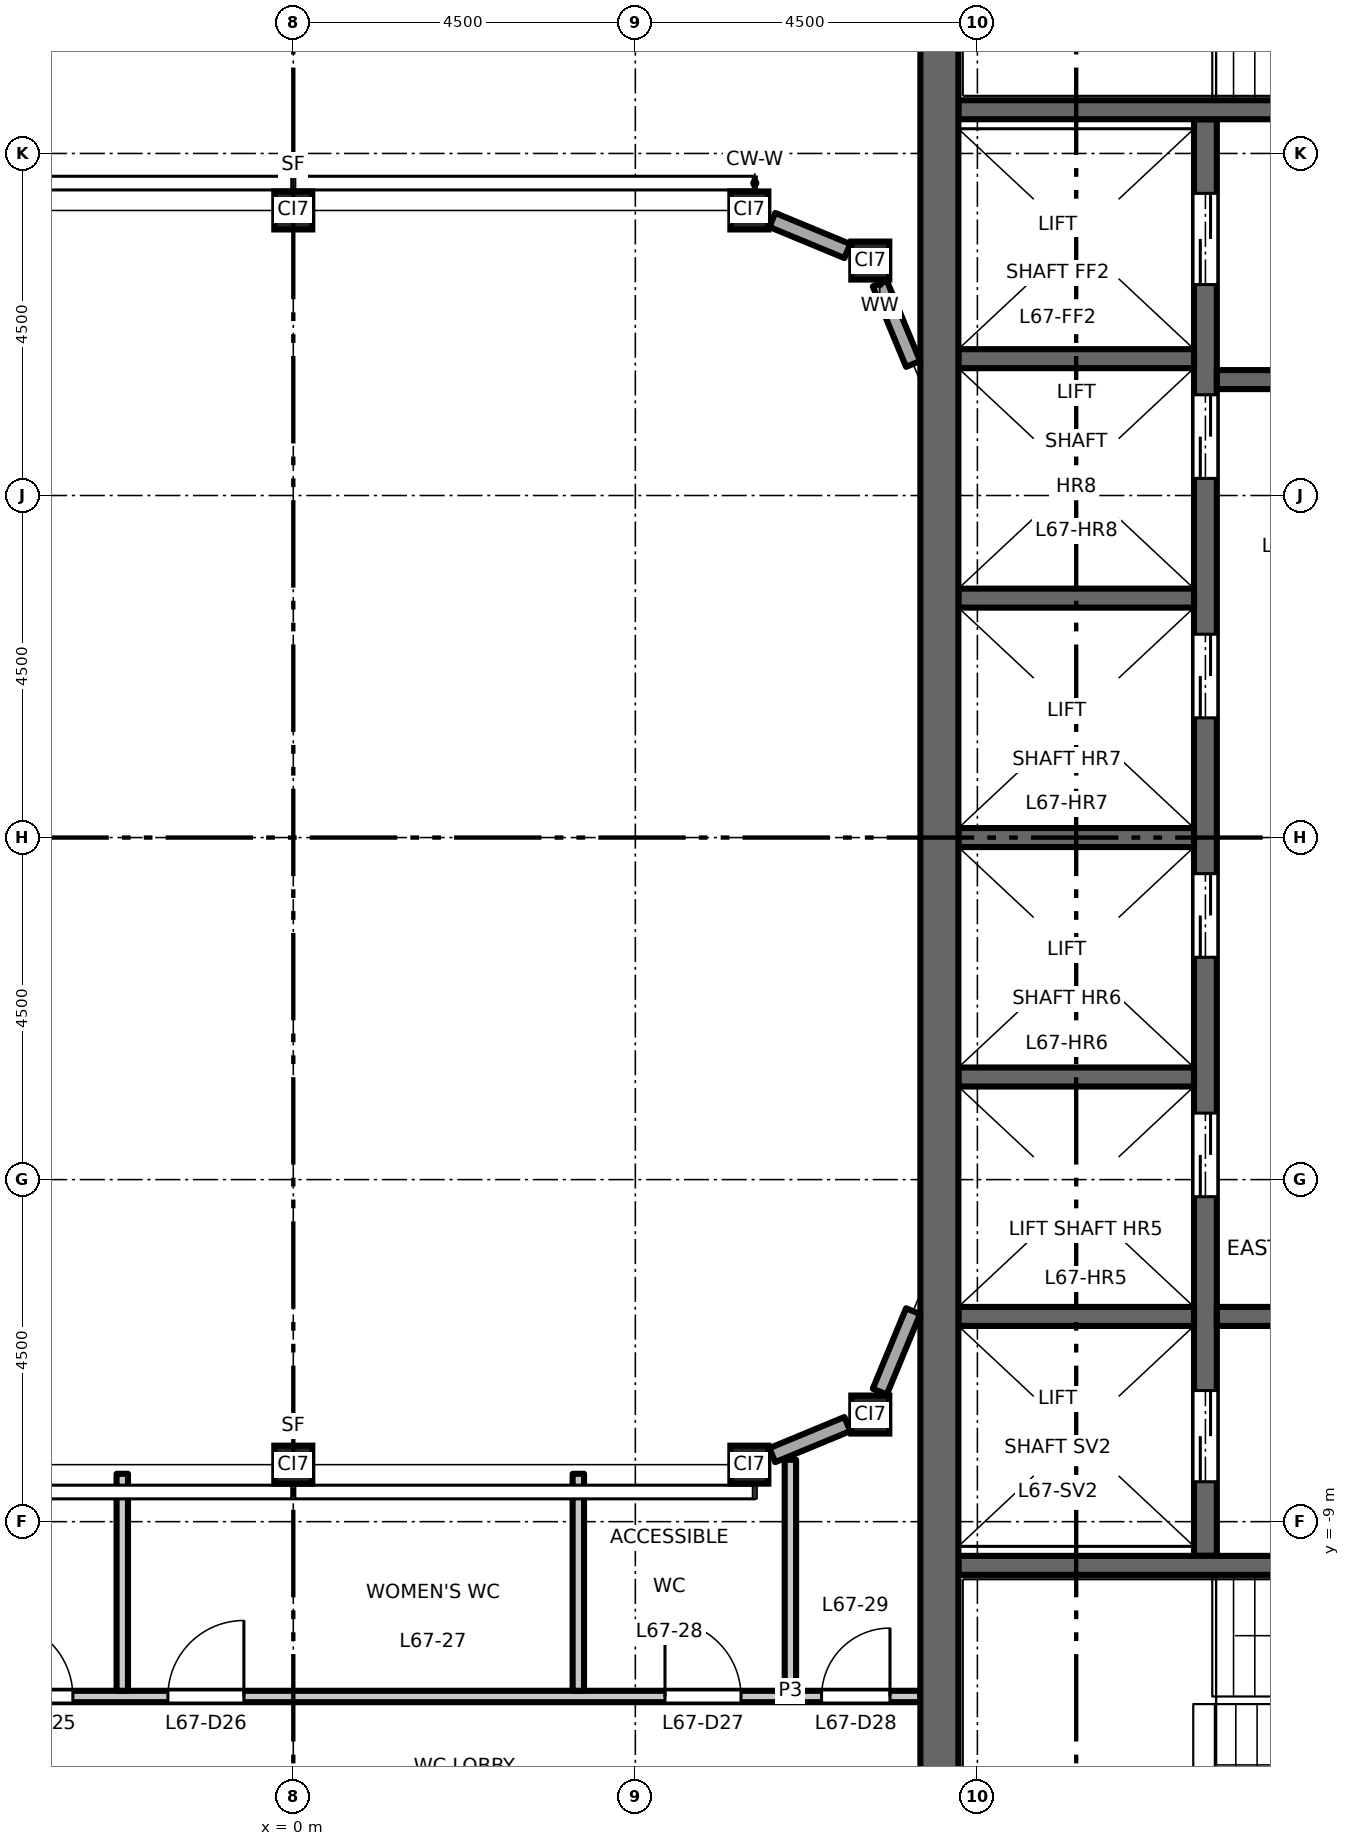
"""IFC4 building model, lengths in metres.
Left out: names, types, materials, properties, quantities, classifications, styles, units other than length and angle.
Written with IfcOpenShell. Run it as: python <this file> out.ifc"""

import sys

from ifc_helpers import new_model, si_unit, direction, frame, frame_2d, origin, origin_2d, place, context, subcontext, project, spatial, rectangle, hollow_rectangle, extrude, element, fill, save


model = new_model("IFC4")
c1 = context("Model", 3, precision=1e-05, world=origin(), true_north=direction((0.0, 1.0)))
c2 = subcontext(c1, "Body", "Model", "MODEL_VIEW")
j1 = project(units=[si_unit("LENGTHUNIT", "METRE"), si_unit("PLANEANGLEUNIT", "RADIAN")], contexts=[c1])
p1 = place(None, origin())
s1 = spatial("IfcSite", under=j1, at=p1, CompositionType="ELEMENT")
p2 = place(p1, origin())
s2 = spatial("IfcBuilding", under=s1, at=p2, CompositionType="ELEMENT")
p3 = place(p2, frame((0.0, 0.0, 312.2)))
s3 = spatial("IfcBuildingStorey", under=s2, at=p3, CompositionType="ELEMENT", Elevation=312.2)
for number, where, z_axis, x_axis in (
    (1, (0.0, -8.25, 0.0), (0.0, 0.0, 1.0), (1.0, 0.0, 0.0)),
    (2, (6.0, -8.25, 0.0), (0.0, 0.0, 1.0), (1.0, 0.0, 0.0)),
    (3, (7.591, -7.591, 0.0), (0.0, 0.0, 1.0), (1.0, 0.0, 0.0)),
    (4, (0.0, 8.25, 0.0), (0.0, 0.0, 1.0), (1.0, 0.0, 0.0)),
    (5, (6.0, 8.25, 0.0), (0.0, 0.0, 1.0), (1.0, 0.0, 0.0)),
    (6, (7.591, 7.591, 0.0), (0.0, 0.0, 1.0), (1.0, 0.0, 0.0)),
):
    element("IfcColumn", number, at=place(p3, frame(where, z_axis=z_axis, x_axis=x_axis)), inside=s3, PredefinedType="COLUMN", context=c2, shape_type="SweptSolid", body=[
        extrude(hollow_rectangle(XDim=0.5, YDim=0.5, WallThickness=0.025, at=origin_2d()), origin(), (0.0, 0.0, 1.0), 4.5),
    ])
p4 = place(p3, frame((12.0, -9.45, 0.0), z_axis=(0.0, 0.0, 1.0), x_axis=(0.0, 1.0, 0.0)))
e7 = element("IfcWall", 7, at=p4, inside=s3, PredefinedType="SHEAR", context=c2, shape_type="SweptSolid", body=[
    extrude(rectangle(XDim=18.9, YDim=0.3, at=frame_2d((9.45, 0.0))), origin(), (0.0, 0.0, 1.0), 4.35),
])
p5 = place(p4, frame((4.725, 0.0, 0.0)))
e8 = element("IfcOpeningElement", 8, at=p5, cuts=e7, PredefinedType="OPENING", context=c2, shape_type="SweptSolid", body=[
    extrude(rectangle(XDim=1.1, YDim=2.1, at=frame_2d((0.55, 1.05))), frame((0.0, 0.16, 0.0), z_axis=(0.0, -1.0, 0.0), x_axis=(1.0, 0.0, 0.0)), (0.0, 0.0, 1.0), 0.32),
])
p6 = place(p4, frame((7.875, 0.0, 0.0)))
e9 = element("IfcOpeningElement", 9, at=p6, cuts=e7, PredefinedType="OPENING", context=c2, shape_type="SweptSolid", body=[
    extrude(rectangle(XDim=1.1, YDim=2.1, at=frame_2d((0.55, 1.05))), frame((0.0, 0.16, 0.0), z_axis=(0.0, -1.0, 0.0), x_axis=(1.0, 0.0, 0.0)), (0.0, 0.0, 1.0), 0.32),
])
p7 = place(p4, frame((11.025, 0.0, 0.0)))
e10 = element("IfcOpeningElement", 10, at=p7, cuts=e7, PredefinedType="OPENING", context=c2, shape_type="SweptSolid", body=[
    extrude(rectangle(XDim=1.1, YDim=2.1, at=frame_2d((0.55, 1.05))), frame((0.0, 0.16, 0.0), z_axis=(0.0, -1.0, 0.0), x_axis=(1.0, 0.0, 0.0)), (0.0, 0.0, 1.0), 0.32),
])
p8 = place(p4, frame((14.175, 0.0, 0.0)))
e11 = element("IfcOpeningElement", 11, at=p8, cuts=e7, PredefinedType="OPENING", context=c2, shape_type="SweptSolid", body=[
    extrude(rectangle(XDim=1.1, YDim=2.1, at=frame_2d((0.55, 1.05))), frame((0.0, 0.16, 0.0), z_axis=(0.0, -1.0, 0.0), x_axis=(1.0, 0.0, 0.0)), (0.0, 0.0, 1.0), 0.32),
])
p9 = place(p4, frame((16.725, 0.0, 0.0)))
e12 = element("IfcOpeningElement", 12, at=p9, cuts=e7, PredefinedType="OPENING", context=c2, shape_type="SweptSolid", body=[
    extrude(rectangle(XDim=1.2, YDim=2.1, at=frame_2d((0.6, 1.05))), frame((0.0, 0.16, 0.0), z_axis=(0.0, -1.0, 0.0), x_axis=(1.0, 0.0, 0.0)), (0.0, 0.0, 1.0), 0.32),
])
p10 = place(p4, frame((0.975, 0.0, 0.0)))
e13 = element("IfcOpeningElement", 13, at=p10, cuts=e7, PredefinedType="OPENING", context=c2, shape_type="SweptSolid", body=[
    extrude(rectangle(XDim=1.2, YDim=2.1, at=frame_2d((0.6, 1.05))), frame((0.0, 0.16, 0.0), z_axis=(0.0, -1.0, 0.0), x_axis=(1.0, 0.0, 0.0)), (0.0, 0.0, 1.0), 0.32),
])
p11 = place(p3, frame((12.15, 6.025, 0.0), z_axis=(0.0, 0.0, 1.0), x_axis=(1.0, 0.0, 0.0)))
e14 = element("IfcWall", 14, at=p11, inside=s3, PredefinedType="SHEAR", context=c2, shape_type="SweptSolid", body=[
    extrude(rectangle(XDim=4.6, YDim=0.25, at=frame_2d((2.3, 0.0))), origin(), (0.0, 0.0, 1.0), 4.35),
])
p12 = place(p11, frame((1.8, 0.0, 0.0)))
e15 = element("IfcOpeningElement", 15, at=p12, cuts=e14, PredefinedType="OPENING", context=c2, shape_type="SweptSolid", body=[
    extrude(rectangle(XDim=1.0, YDim=2.1, at=frame_2d((0.5, 1.05))), frame((0.0, 0.135, 0.0), z_axis=(0.0, -1.0, 0.0), x_axis=(1.0, 0.0, 0.0)), (0.0, 0.0, 1.0), 0.27),
])
p13 = place(p3, frame((12.15, -6.3, 0.0), z_axis=(0.0, 0.0, 1.0), x_axis=(1.0, 0.0, 0.0)))
e16 = element("IfcWall", 16, at=p13, inside=s3, PredefinedType="SHEAR", context=c2, shape_type="SweptSolid", body=[
    extrude(rectangle(XDim=4.6, YDim=0.25, at=frame_2d((2.3, 0.0))), origin(), (0.0, 0.0, 1.0), 4.35),
])
p14 = place(p13, frame((1.8, 0.0, 0.0)))
e17 = element("IfcOpeningElement", 17, at=p14, cuts=e16, PredefinedType="OPENING", context=c2, shape_type="SweptSolid", body=[
    extrude(rectangle(XDim=1.0, YDim=2.1, at=frame_2d((0.5, 1.05))), frame((0.0, 0.135, 0.0), z_axis=(0.0, -1.0, 0.0), x_axis=(1.0, 0.0, 0.0)), (0.0, 0.0, 1.0), 0.27),
])
for number, where, z_axis, x_axis in (
    (18, (8.75, 0.0, 0.0), (0.0, 0.0, 1.0), (1.0, 0.0, 0.0)),
    (19, (8.75, 3.15, 0.0), (0.0, 0.0, 1.0), (1.0, 0.0, 0.0)),
    (20, (8.75, 6.3, 0.0), (0.0, 0.0, 1.0), (1.0, 0.0, 0.0)),
    (21, (8.75, -3.15, 0.0), (0.0, 0.0, 1.0), (1.0, 0.0, 0.0)),
    (22, (8.75, -6.3, 0.0), (0.0, 0.0, 1.0), (1.0, 0.0, 0.0)),
):
    element("IfcWall", number, at=place(p3, frame(where, z_axis=z_axis, x_axis=x_axis)), inside=s3, PredefinedType="SHEAR", context=c2, shape_type="SweptSolid", body=[
        extrude(rectangle(XDim=3.1, YDim=0.25, at=frame_2d((1.55, 0.0))), origin(), (0.0, 0.0, 1.0), 4.35),
    ])
p15 = place(p3, frame((8.75, 9.575, 0.0), z_axis=(0.0, 0.0, 1.0), x_axis=(1.0, 0.0, 0.0)))
e23 = element("IfcWall", 23, at=p15, inside=s3, PredefinedType="SHEAR", context=c2, shape_type="SweptSolid", body=[
    extrude(rectangle(XDim=8.0, YDim=0.25, at=frame_2d((4.0, 0.0))), origin(), (0.0, 0.0, 1.0), 4.35),
])
p16 = place(p15, frame((6.65, 0.0, 0.0)))
e24 = element("IfcOpeningElement", 24, at=p16, cuts=e23, PredefinedType="OPENING", context=c2, shape_type="SweptSolid", body=[
    extrude(rectangle(XDim=1.1, YDim=2.1, at=frame_2d((0.55, 1.05))), frame((0.0, 0.135, 0.0), z_axis=(0.0, -1.0, 0.0), x_axis=(1.0, 0.0, 0.0)), (0.0, 0.0, 1.0), 0.27),
])
p17 = place(p3, frame((8.75, -9.575, 0.0), z_axis=(0.0, 0.0, 1.0), x_axis=(1.0, 0.0, 0.0)))
e25 = element("IfcWall", 25, at=p17, inside=s3, PredefinedType="SHEAR", context=c2, shape_type="SweptSolid", body=[
    extrude(rectangle(XDim=8.0, YDim=0.25, at=frame_2d((4.0, 0.0))), origin(), (0.0, 0.0, 1.0), 4.35),
])
p18 = place(p17, frame((6.65, 0.0, 0.0)))
e26 = element("IfcOpeningElement", 26, at=p18, cuts=e25, PredefinedType="OPENING", context=c2, shape_type="SweptSolid", body=[
    extrude(rectangle(XDim=1.1, YDim=2.1, at=frame_2d((0.55, 1.05))), frame((0.0, 0.135, 0.0), z_axis=(0.0, -1.0, 0.0), x_axis=(1.0, 0.0, 0.0)), (0.0, 0.0, 1.0), 0.27),
])
p19 = place(p3, frame((8.5, -13.0, 0.0), z_axis=(0.0, 0.0, 1.0), x_axis=(0.0, 1.0, 0.0)))
e27 = element("IfcWall", 27, at=p19, inside=s3, PredefinedType="SHEAR", context=c2, shape_type="SweptSolid", body=[
    extrude(rectangle(XDim=26.0, YDim=0.5, at=frame_2d((13.0, 0.0))), origin(), (0.0, 0.0, 1.0), 4.35),
])
p20 = place(p3, frame((6.302, -8.125, 0.0), z_axis=(0.0, 0.0, 1.0), x_axis=(0.923919409248, 0.382587147216, 0.0)))
e28 = element("IfcWall", 28, at=p20, inside=s3, PredefinedType="STANDARD", context=c2, shape_type="SweptSolid", body=[
    extrude(rectangle(XDim=1.069, YDim=0.2, at=frame_2d((0.534, 0.0))), origin(), (0.0, 0.0, 1.0), 4.01),
])
for number, where, z_axis, x_axis in (
    (29, (7.716, -7.289, 0.0), (0.0, 0.0, 1.0), (0.383, 0.924, 0.0)),
    (30, (8.154, 6.231, 0.0), (0.0, 0.0, 1.0), (-0.383, 0.924, 0.0)),
):
    element("IfcWall", number, at=place(p3, frame(where, z_axis=z_axis, x_axis=x_axis)), inside=s3, PredefinedType="STANDARD", context=c2, shape_type="SweptSolid", body=[
        extrude(rectangle(XDim=1.146, YDim=0.2, at=frame_2d((0.573, 0.0))), origin(), (0.0, 0.0, 1.0), 4.01),
    ])
p21 = place(p3, frame((7.289, 7.716, 0.0), z_axis=(0.0, 0.0, 1.0), x_axis=(-0.923919409248, 0.382587147216, 0.0)))
e31 = element("IfcWall", 31, at=p21, inside=s3, PredefinedType="STANDARD", context=c2, shape_type="SweptSolid", body=[
    extrude(rectangle(XDim=1.069, YDim=0.2, at=frame_2d((0.534, 0.0))), origin(), (0.0, 0.0, 1.0), 4.01),
])
p22 = place(p3, frame((-8.25, -11.3, 0.0), z_axis=(0.0, 0.0, 1.0), x_axis=(1.0, 0.0, 0.0)))
e32 = element("IfcWall", 32, at=p22, inside=s3, PredefinedType="PARTITIONING", context=c2, shape_type="SweptSolid", body=[
    extrude(rectangle(XDim=14.79, YDim=0.15, at=frame_2d((7.395, 0.0))), origin(), (0.0, 0.0, 1.0), 4.35),
])
p23 = place(p22, frame((4.35, 0.0, 0.0)))
e33 = element("IfcOpeningElement", 33, at=p23, cuts=e32, PredefinedType="OPENING", context=c2, shape_type="SweptSolid", body=[
    extrude(rectangle(XDim=1.0, YDim=2.1, at=frame_2d((0.5, 1.05))), frame((0.0, 0.085, 0.0), z_axis=(0.0, -1.0, 0.0), x_axis=(1.0, 0.0, 0.0)), (0.0, 0.0, 1.0), 0.17),
])
p24 = place(p22, frame((6.6, 0.0, 0.0)))
e34 = element("IfcOpeningElement", 34, at=p24, cuts=e32, PredefinedType="OPENING", context=c2, shape_type="SweptSolid", body=[
    extrude(rectangle(XDim=1.0, YDim=2.1, at=frame_2d((0.5, 1.05))), frame((0.0, 0.085, 0.0), z_axis=(0.0, -1.0, 0.0), x_axis=(1.0, 0.0, 0.0)), (0.0, 0.0, 1.0), 0.17),
])
p25 = place(p22, frame((13.14, 0.0, 0.0)))
e35 = element("IfcOpeningElement", 35, at=p25, cuts=e32, PredefinedType="OPENING", context=c2, shape_type="SweptSolid", body=[
    extrude(rectangle(XDim=1.0, YDim=2.1, at=frame_2d((0.5, 1.05))), frame((0.0, 0.085, 0.0), z_axis=(0.0, -1.0, 0.0), x_axis=(1.0, 0.0, 0.0)), (0.0, 0.0, 1.0), 0.17),
])
p26 = place(p3, frame((6.54, -11.3, 0.0), z_axis=(0.0, 0.0, 1.0), x_axis=(1.0, 0.0, 0.0)))
e36 = element("IfcWall", 36, at=p26, inside=s3, PredefinedType="PARTITIONING", context=c2, shape_type="SweptSolid", body=[
    extrude(rectangle(XDim=1.71, YDim=0.15, at=frame_2d((0.855, 0.0))), origin(), (0.0, 0.0, 1.0), 4.35),
])
p27 = place(p26, frame((0.41, 0.0, 0.0)))
e37 = element("IfcOpeningElement", 37, at=p27, cuts=e36, PredefinedType="OPENING", context=c2, shape_type="SweptSolid", body=[
    extrude(rectangle(XDim=0.9, YDim=2.1, at=frame_2d((0.45, 1.05))), frame((0.0, 0.085, 0.0), z_axis=(0.0, -1.0, 0.0), x_axis=(1.0, 0.0, 0.0)), (0.0, 0.0, 1.0), 0.17),
])
for number, where, z_axis, x_axis in (
    (38, (-2.25, -11.225, 0.0), (0.0, 0.0, 1.0), (0.0, 1.0, 0.0)),
    (39, (3.75, -11.225, 0.0), (0.0, 0.0, 1.0), (0.0, 1.0, 0.0)),
):
    element("IfcWall", number, at=place(p3, frame(where, z_axis=z_axis, x_axis=x_axis)), inside=s3, PredefinedType="PARTITIONING", context=c2, shape_type="SweptSolid", body=[
        extrude(rectangle(XDim=2.855, YDim=0.15, at=frame_2d((1.427, 0.0))), origin(), (0.0, 0.0, 1.0), 4.35),
    ])
p28 = place(p3, frame((6.54, -11.225, 0.0), z_axis=(0.0, 0.0, 1.0), x_axis=(0.0, 1.0, 0.0)))
e40 = element("IfcWall", 40, at=p28, inside=s3, PredefinedType="PARTITIONING", context=c2, shape_type="SweptSolid", body=[
    extrude(rectangle(XDim=3.039, YDim=0.15, at=frame_2d((1.52, 0.0))), origin(), (0.0, 0.0, 1.0), 4.35),
])
p29 = place(p5, origin())
e41 = element("IfcDoor", 41, at=p29, inside=s3, OperationType="DOUBLE_DOOR_SLIDING", PredefinedType="DOOR", context=c2, shape_type="SweptSolid", body=[
    extrude(rectangle(XDim=1.1, YDim=2.1, at=frame_2d((0.55, 1.05))), frame((0.0, 0.025, 0.0), z_axis=(0.0, -1.0, 0.0), x_axis=(1.0, 0.0, 0.0)), (0.0, 0.0, 1.0), 0.05),
])
fill(e8, e41)
p30 = place(p6, origin())
e42 = element("IfcDoor", 42, at=p30, inside=s3, OperationType="DOUBLE_DOOR_SLIDING", PredefinedType="DOOR", context=c2, shape_type="SweptSolid", body=[
    extrude(rectangle(XDim=1.1, YDim=2.1, at=frame_2d((0.55, 1.05))), frame((0.0, 0.025, 0.0), z_axis=(0.0, -1.0, 0.0), x_axis=(1.0, 0.0, 0.0)), (0.0, 0.0, 1.0), 0.05),
])
fill(e9, e42)
p31 = place(p7, origin())
e43 = element("IfcDoor", 43, at=p31, inside=s3, OperationType="DOUBLE_DOOR_SLIDING", PredefinedType="DOOR", context=c2, shape_type="SweptSolid", body=[
    extrude(rectangle(XDim=1.1, YDim=2.1, at=frame_2d((0.55, 1.05))), frame((0.0, 0.025, 0.0), z_axis=(0.0, -1.0, 0.0), x_axis=(1.0, 0.0, 0.0)), (0.0, 0.0, 1.0), 0.05),
])
fill(e10, e43)
p32 = place(p8, origin())
e44 = element("IfcDoor", 44, at=p32, inside=s3, OperationType="DOUBLE_DOOR_SLIDING", PredefinedType="DOOR", context=c2, shape_type="SweptSolid", body=[
    extrude(rectangle(XDim=1.1, YDim=2.1, at=frame_2d((0.55, 1.05))), frame((0.0, 0.025, 0.0), z_axis=(0.0, -1.0, 0.0), x_axis=(1.0, 0.0, 0.0)), (0.0, 0.0, 1.0), 0.05),
])
fill(e11, e44)
p33 = place(p9, origin())
e45 = element("IfcDoor", 45, at=p33, inside=s3, OperationType="DOUBLE_DOOR_SLIDING", PredefinedType="DOOR", context=c2, shape_type="SweptSolid", body=[
    extrude(rectangle(XDim=1.2, YDim=2.1, at=frame_2d((0.6, 1.05))), frame((0.0, 0.025, 0.0), z_axis=(0.0, -1.0, 0.0), x_axis=(1.0, 0.0, 0.0)), (0.0, 0.0, 1.0), 0.05),
])
fill(e12, e45)
p34 = place(p10, origin())
e46 = element("IfcDoor", 46, at=p34, inside=s3, OperationType="DOUBLE_DOOR_SLIDING", PredefinedType="DOOR", context=c2, shape_type="SweptSolid", body=[
    extrude(rectangle(XDim=1.2, YDim=2.1, at=frame_2d((0.6, 1.05))), frame((0.0, 0.025, 0.0), z_axis=(0.0, -1.0, 0.0), x_axis=(1.0, 0.0, 0.0)), (0.0, 0.0, 1.0), 0.05),
])
fill(e13, e46)
p35 = place(p23, origin())
e47 = element("IfcDoor", 47, at=p35, inside=s3, OperationType="SINGLE_SWING_LEFT", PredefinedType="DOOR", context=c2, shape_type="SweptSolid", body=[
    extrude(rectangle(XDim=1.0, YDim=2.1, at=frame_2d((0.5, 1.05))), frame((0.0, 0.025, 0.0), z_axis=(0.0, -1.0, 0.0), x_axis=(1.0, 0.0, 0.0)), (0.0, 0.0, 1.0), 0.05),
])
fill(e33, e47)
p36 = place(p24, origin())
e48 = element("IfcDoor", 48, at=p36, inside=s3, OperationType="SINGLE_SWING_RIGHT", PredefinedType="DOOR", context=c2, shape_type="SweptSolid", body=[
    extrude(rectangle(XDim=1.0, YDim=2.1, at=frame_2d((0.5, 1.05))), frame((0.0, 0.025, 0.0), z_axis=(0.0, -1.0, 0.0), x_axis=(1.0, 0.0, 0.0)), (0.0, 0.0, 1.0), 0.05),
])
fill(e34, e48)
p37 = place(p25, origin())
e49 = element("IfcDoor", 49, at=p37, inside=s3, OperationType="SINGLE_SWING_LEFT", PredefinedType="DOOR", context=c2, shape_type="SweptSolid", body=[
    extrude(rectangle(XDim=1.0, YDim=2.1, at=frame_2d((0.5, 1.05))), frame((0.0, 0.025, 0.0), z_axis=(0.0, -1.0, 0.0), x_axis=(1.0, 0.0, 0.0)), (0.0, 0.0, 1.0), 0.05),
])
fill(e35, e49)
p38 = place(p27, origin())
e50 = element("IfcDoor", 50, at=p38, inside=s3, OperationType="SINGLE_SWING_RIGHT", PredefinedType="DOOR", context=c2, shape_type="SweptSolid", body=[
    extrude(rectangle(XDim=0.9, YDim=2.1, at=frame_2d((0.45, 1.05))), frame((0.0, 0.025, 0.0), z_axis=(0.0, -1.0, 0.0), x_axis=(1.0, 0.0, 0.0)), (0.0, 0.0, 1.0), 0.05),
])
fill(e37, e50)
save(model, sys.argv[1])
